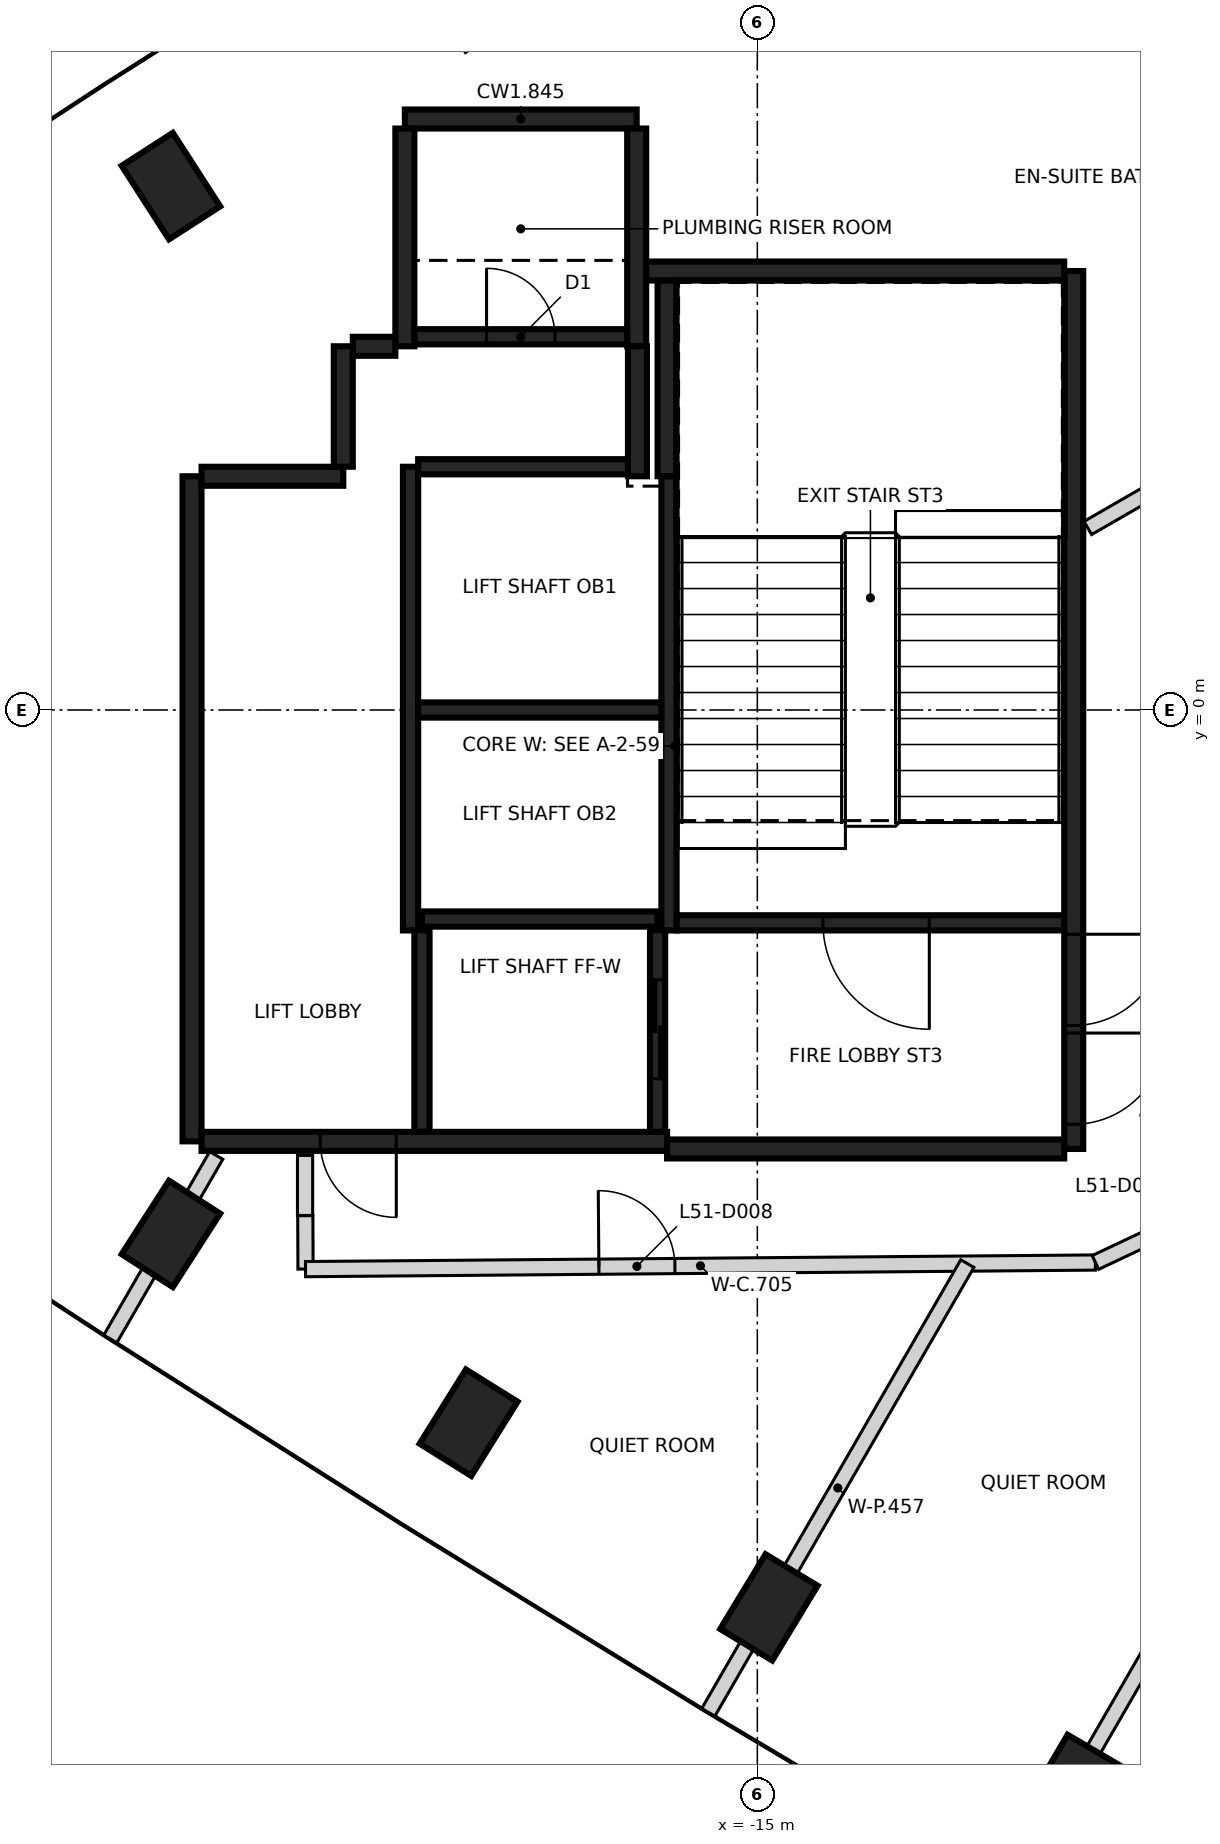
"""IFC4 building model, lengths in metres.
Left out: names, types, materials, properties, quantities, classifications, styles, units other than length and angle.
Written with IfcOpenShell. Run it as: python <this file> out.ifc"""

import sys

from ifc_helpers import new_model, si_unit, direction, frame, frame_2d, origin, origin_2d, place, context, subcontext, project, spatial, rectangle, extrude, element, fill, save


model = new_model("IFC4")
c1 = context("Model", 3, precision=1e-05, world=origin(), true_north=direction((0.0, 1.0)))
c2 = subcontext(c1, "Body", "Model", "MODEL_VIEW")
j1 = project(units=[si_unit("LENGTHUNIT", "METRE"), si_unit("PLANEANGLEUNIT", "RADIAN")], contexts=[c1])
p1 = place(None, origin())
s1 = spatial("IfcSite", under=j1, at=p1, CompositionType="ELEMENT")
p2 = place(p1, origin())
s2 = spatial("IfcBuilding", under=s1, at=p2, CompositionType="ELEMENT")
p3 = place(p2, frame((0.0, 0.0, 204.4)))
s3 = spatial("IfcBuildingStorey", under=s2, at=p3, CompositionType="ELEMENT", Elevation=204.4)
for number, where, z_axis, x_axis in (
    (1, (-22.715, 6.892, -0.35), (0.0, 0.0, 1.0), (-0.541, 0.841, 0.0)),
    (2, (-22.715, -6.892, -0.35), (0.0, 0.0, 1.0), (0.541, 0.841, 0.0)),
    (3, (-18.799, -9.376, -0.35), (0.0, 0.0, 1.0), (0.529, 0.848, 0.0)),
    (4, (-14.848, -11.806, -0.35), (0.0, 0.0, 1.0), (0.518, 0.855, 0.0)),
    (5, (-10.864, -14.18, -0.35), (0.0, 0.0, 1.0), (0.506, 0.862, 0.0)),
):
    element("IfcColumn", number, at=place(p3, frame(where, z_axis=z_axis, x_axis=x_axis)), inside=s3, PredefinedType="COLUMN", context=c2, shape_type="SweptSolid", body=[
        extrude(rectangle(XDim=1.15, YDim=0.8, at=origin_2d()), origin(), (0.0, 0.0, 1.0), 3.6),
    ])
p4 = place(p3, frame((-10.837, 5.775, 0.0), z_axis=(0.0, 0.0, 1.0), x_axis=(0.0, -1.0, 0.0)))
e6 = element("IfcWall", 6, at=p4, inside=s3, PredefinedType="SHEAR", context=c2, shape_type="SweptSolid", body=[
    extrude(rectangle(XDim=11.55, YDim=0.25, at=frame_2d((5.775, 0.0))), origin(), (0.0, 0.0, 1.0), 3.25),
])
p5 = place(p4, frame((10.025, 0.0, 0.0)))
e7 = element("IfcOpeningElement", 7, at=p5, cuts=e6, PredefinedType="OPENING", context=c2, shape_type="SweptSolid", body=[
    extrude(rectangle(XDim=1.2, YDim=2.1, at=frame_2d((0.6, 1.05))), frame((0.0, 0.135, 0.0), z_axis=(0.0, -1.0, 0.0), x_axis=(1.0, 0.0, 0.0)), (0.0, 0.0, 1.0), 0.27),
])
p6 = place(p4, frame((8.725, 0.0, 0.0)))
e8 = element("IfcOpeningElement", 8, at=p6, cuts=e6, PredefinedType="OPENING", context=c2, shape_type="SweptSolid", body=[
    extrude(rectangle(XDim=1.2, YDim=2.1, at=frame_2d((0.6, 1.05))), frame((0.0, 0.135, 0.0), z_axis=(0.0, -1.0, 0.0), x_axis=(1.0, 0.0, 0.0)), (0.0, 0.0, 1.0), 0.27),
])
p7 = place(p3, frame((-22.437, -5.675, 0.0), z_axis=(0.0, 0.0, 1.0), x_axis=(0.0, 1.0, 0.0)))
e9 = element("IfcWall", 9, at=p7, inside=s3, PredefinedType="SHEAR", context=c2, shape_type="SweptSolid", body=[
    extrude(rectangle(XDim=8.75, YDim=0.25, at=frame_2d((4.375, 0.0))), origin(), (0.0, 0.0, 1.0), 3.25),
])
p8 = place(p3, frame((-16.187, -5.675, 0.0), z_axis=(0.0, 0.0, 1.0), x_axis=(-1.0, 0.0, 0.0)))
e10 = element("IfcWall", 10, at=p8, inside=s3, PredefinedType="SHEAR", context=c2, shape_type="SweptSolid", body=[
    extrude(rectangle(XDim=6.125, YDim=0.25, at=frame_2d((3.062, 0.0))), origin(), (0.0, 0.0, 1.0), 3.25),
])
p9 = place(p8, frame((3.563, 0.0, 0.0)))
e11 = element("IfcOpeningElement", 11, at=p9, cuts=e10, PredefinedType="OPENING", context=c2, shape_type="SweptSolid", body=[
    extrude(rectangle(XDim=1.0, YDim=2.1, at=frame_2d((0.5, 1.05))), frame((0.0, 0.135, 0.0), z_axis=(0.0, -1.0, 0.0), x_axis=(1.0, 0.0, 0.0)), (0.0, 0.0, 1.0), 0.27),
])
p10 = place(p3, frame((-10.963, -5.775, 0.0), z_axis=(0.0, 0.0, 1.0), x_axis=(-1.0, 0.0, 0.0)))
e12 = element("IfcWall", 12, at=p10, inside=s3, PredefinedType="SHEAR", context=c2, shape_type="SweptSolid", body=[
    extrude(rectangle(XDim=5.225, YDim=0.25, at=frame_2d((2.612, 0.0))), origin(), (0.0, 0.0, 1.0), 3.25),
])
p11 = place(p3, frame((-16.472, 5.775, 0.0), z_axis=(0.0, 0.0, 1.0), x_axis=(1.0, 0.0, 0.0)))
e13 = element("IfcWall", 13, at=p11, inside=s3, PredefinedType="SHEAR", context=c2, shape_type="SweptSolid", body=[
    extrude(rectangle(XDim=5.51, YDim=0.25, at=frame_2d((2.755, 0.0))), origin(), (0.0, 0.0, 1.0), 3.25),
])
p12 = place(p3, frame((-19.637, 7.775, 0.0), z_axis=(0.0, 0.0, 1.0), x_axis=(1.0, 0.0, 0.0)))
e14 = element("IfcWall", 14, at=p12, inside=s3, PredefinedType="SHEAR", context=c2, shape_type="SweptSolid", body=[
    extrude(rectangle(XDim=3.05, YDim=0.25, at=frame_2d((1.525, 0.0))), origin(), (0.0, 0.0, 1.0), 3.25),
])
for number, where, z_axis, x_axis in (
    (15, (-16.587, 7.65, 0.0), (0.0, 0.0, 1.0), (0.0, -1.0, 0.0)),
    (16, (-19.637, 4.785, 0.0), (0.0, 0.0, 1.0), (0.0, 1.0, 0.0)),
):
    element("IfcWall", number, at=place(p3, frame(where, z_axis=z_axis, x_axis=x_axis)), inside=s3, PredefinedType="SHEAR", context=c2, shape_type="SweptSolid", body=[
        extrude(rectangle(XDim=2.865, YDim=0.25, at=frame_2d((1.432, 0.0))), origin(), (0.0, 0.0, 1.0), 3.25),
    ])
p13 = place(p3, frame((-16.187, 3.075, 0.0), z_axis=(0.0, 0.0, 1.0), x_axis=(0.0, 1.0, 0.0)))
e17 = element("IfcWall", 17, at=p13, inside=s3, PredefinedType="SHEAR", context=c2, shape_type="SweptSolid", body=[
    extrude(rectangle(XDim=2.575, YDim=0.25, at=frame_2d((1.287, 0.0))), origin(), (0.0, 0.0, 1.0), 3.25),
])
p14 = place(p3, frame((-22.312, 3.075, 0.0), z_axis=(0.0, 0.0, 1.0), x_axis=(1.0, 0.0, 0.0)))
e18 = element("IfcWall", 18, at=p14, inside=s3, PredefinedType="SHEAR", context=c2, shape_type="SweptSolid", body=[
    extrude(rectangle(XDim=1.865, YDim=0.25, at=frame_2d((0.932, 0.0))), origin(), (0.0, 0.0, 1.0), 3.25),
])
p15 = place(p3, frame((-16.577, 4.785, 0.0), z_axis=(0.0, 0.0, 1.0), x_axis=(0.0, -1.0, 0.0)))
e19 = element("IfcWall", 19, at=p15, inside=s3, PredefinedType="SHEAR", context=c2, shape_type="SweptSolid", body=[
    extrude(rectangle(XDim=1.71, YDim=0.25, at=frame_2d((0.855, 0.0))), origin(), (0.0, 0.0, 1.0), 3.25),
])
p16 = place(p3, frame((-20.447, 3.2, 0.0), z_axis=(0.0, 0.0, 1.0), x_axis=(0.0, 1.0, 0.0)))
e20 = element("IfcWall", 20, at=p16, inside=s3, PredefinedType="SHEAR", context=c2, shape_type="SweptSolid", body=[
    extrude(rectangle(XDim=1.584, YDim=0.25, at=frame_2d((0.792, 0.0))), origin(), (0.0, 0.0, 1.0), 3.25),
])
p17 = place(p3, frame((-20.322, 4.785, 0.0), z_axis=(0.0, 0.0, 1.0), x_axis=(1.0, 0.0, 0.0)))
e21 = element("IfcWall", 21, at=p17, inside=s3, PredefinedType="SHEAR", context=c2, shape_type="SweptSolid", body=[
    extrude(rectangle(XDim=0.559, YDim=0.25, at=frame_2d((0.28, 0.0))), origin(), (0.0, 0.0, 1.0), 3.25),
])
p18 = place(p3, frame((-16.162, 3.074, 0.0), z_axis=(0.0, 0.0, 1.0), x_axis=(0.0, -1.0, 0.0)))
e22 = element("IfcWall", 22, at=p18, inside=s3, PredefinedType="SHEAR", context=c2, shape_type="SweptSolid", body=[
    extrude(rectangle(XDim=5.974, YDim=0.2, at=frame_2d((2.987, 0.0))), origin(), (0.0, 0.0, 1.0), 3.25),
])
p19 = place(p3, frame((-19.562, -2.9, 0.0), z_axis=(0.0, 0.0, 1.0), x_axis=(0.0, 1.0, 0.0)))
e23 = element("IfcWall", 23, at=p19, inside=s3, PredefinedType="SHEAR", context=c2, shape_type="SweptSolid", body=[
    extrude(rectangle(XDim=6.1, YDim=0.2, at=frame_2d((3.05, 0.0))), origin(), (0.0, 0.0, 1.0), 3.25),
])
p20 = place(p3, frame((-10.963, -2.8, 0.0), z_axis=(0.0, 0.0, 1.0), x_axis=(-1.0, 0.0, 0.0)))
e24 = element("IfcWall", 24, at=p20, inside=s3, PredefinedType="SHEAR", context=c2, shape_type="SweptSolid", body=[
    extrude(rectangle(XDim=5.098, YDim=0.2, at=frame_2d((2.549, 0.0))), origin(), (0.0, 0.0, 1.0), 3.25),
])
p21 = place(p20, frame((1.774, 0.0, 0.0)))
e25 = element("IfcOpeningElement", 25, at=p21, cuts=e24, PredefinedType="OPENING", context=c2, shape_type="SweptSolid", body=[
    extrude(rectangle(XDim=1.4, YDim=2.1, at=frame_2d((0.7, 1.05))), frame((0.0, 0.11, 0.0), z_axis=(0.0, -1.0, 0.0), x_axis=(1.0, 0.0, 0.0)), (0.0, 0.0, 1.0), 0.22),
])
p22 = place(p3, frame((-16.263, 0.0, 0.0), z_axis=(0.0, 0.0, 1.0), x_axis=(-1.0, 0.0, 0.0)))
e26 = element("IfcWall", 26, at=p22, inside=s3, PredefinedType="SHEAR", context=c2, shape_type="SweptSolid", body=[
    extrude(rectangle(XDim=3.198, YDim=0.2, at=frame_2d((1.599, 0.0))), origin(), (0.0, 0.0, 1.0), 3.25),
])
p23 = place(p3, frame((-19.511, 4.91, 0.0), z_axis=(0.0, 0.0, 1.0), x_axis=(1.0, 0.0, 0.0)))
e27 = element("IfcWall", 27, at=p23, inside=s3, PredefinedType="SHEAR", context=c2, shape_type="SweptSolid", body=[
    extrude(rectangle(XDim=2.798, YDim=0.2, at=frame_2d((1.399, 0.0))), origin(), (0.0, 0.0, 1.0), 3.25),
])
p24 = place(p23, frame((0.949, 0.0, 0.0)))
e28 = element("IfcOpeningElement", 28, at=p24, cuts=e27, PredefinedType="OPENING", context=c2, shape_type="SweptSolid", body=[
    extrude(rectangle(XDim=0.9, YDim=2.1, at=frame_2d((0.45, 1.05))), frame((0.0, 0.11, 0.0), z_axis=(0.0, -1.0, 0.0), x_axis=(1.0, 0.0, 0.0)), (0.0, 0.0, 1.0), 0.22),
])
p25 = place(p3, frame((-19.462, 3.2, 0.0), z_axis=(0.0, 0.0, 1.0), x_axis=(1.0, 0.0, 0.0)))
e29 = element("IfcWall", 29, at=p25, inside=s3, PredefinedType="SHEAR", context=c2, shape_type="SweptSolid", body=[
    extrude(rectangle(XDim=2.759, YDim=0.2, at=frame_2d((1.379, 0.0))), origin(), (0.0, 0.0, 1.0), 3.25),
])
p26 = place(p3, frame((-19.412, -2.75, 0.0), z_axis=(0.0, 0.0, 1.0), x_axis=(1.0, 0.0, 0.0)))
e30 = element("IfcWall", 30, at=p26, inside=s3, PredefinedType="SHEAR", context=c2, shape_type="SweptSolid", body=[
    extrude(rectangle(XDim=3.1, YDim=0.2, at=frame_2d((1.55, 0.0))), origin(), (0.0, 0.0, 1.0), 3.25),
])
p27 = place(p3, frame((-16.312, -2.898, 0.0), z_axis=(0.0, 0.0, 1.0), x_axis=(0.0, -1.0, 0.0)))
e31 = element("IfcWall", 31, at=p27, inside=s3, PredefinedType="SHEAR", context=c2, shape_type="SweptSolid", body=[
    extrude(rectangle(XDim=2.651, YDim=0.2, at=frame_2d((1.325, 0.0))), origin(), (0.0, 0.0, 1.0), 3.25),
])
p28 = place(p27, frame((0.652, 0.0, 0.0)))
e32 = element("IfcOpeningElement", 32, at=p28, cuts=e31, PredefinedType="OPENING", context=c2, shape_type="SweptSolid", body=[
    extrude(rectangle(XDim=1.3, YDim=2.1, at=frame_2d((0.65, 1.05))), frame((0.0, 0.11, 0.0), z_axis=(0.0, -1.0, 0.0), x_axis=(1.0, 0.0, 0.0)), (0.0, 0.0, 1.0), 0.22),
])
p29 = place(p3, frame((-19.412, -5.549, 0.0), z_axis=(0.0, 0.0, 1.0), x_axis=(0.0, 1.0, 0.0)))
e33 = element("IfcWall", 33, at=p29, inside=s3, PredefinedType="SHEAR", context=c2, shape_type="SweptSolid", body=[
    extrude(rectangle(XDim=2.651, YDim=0.2, at=frame_2d((1.325, 0.0))), origin(), (0.0, 0.0, 1.0), 3.25),
])
p30 = place(p3, frame((-20.95, -6.65, 0.0), z_axis=(0.0, 0.0, 1.0), x_axis=(0.0, 1.0, 0.0)))
e34 = element("IfcWall", 34, at=p30, inside=s3, PredefinedType="PARTITIONING", context=c2, shape_type="SweptSolid", body=[
    extrude(rectangle(XDim=0.79, YDim=0.2, at=frame_2d((0.395, 0.0))), origin(), (0.0, 0.0, 1.0), 3.25),
])
p31 = place(p3, frame((-20.947, -6.653, 0.0), z_axis=(0.0, 0.0, 1.0), x_axis=(0.004173876686, -0.999991289339, 0.0)))
e35 = element("IfcWall", 35, at=p31, inside=s3, PredefinedType="PARTITIONING", context=c2, shape_type="SweptSolid", body=[
    extrude(rectangle(XDim=0.702, YDim=0.2, at=frame_2d((0.351, 0.0))), origin(), (0.0, 0.0, 1.0), 3.25),
])
p32 = place(p3, frame((-20.944, -7.356, 0.0), z_axis=(0.0, 0.0, 1.0), x_axis=(0.999965021341, 0.008363976025, 0.0)))
e36 = element("IfcWall", 36, at=p32, inside=s3, PredefinedType="PARTITIONING", context=c2, shape_type="SweptSolid", body=[
    extrude(rectangle(XDim=10.391, YDim=0.2, at=frame_2d((5.196, 0.0))), origin(), (0.0, 0.0, 1.0), 3.25),
])
p33 = place(p32, frame((3.86, 0.0, 0.0)))
e37 = element("IfcOpeningElement", 37, at=p33, cuts=e36, PredefinedType="OPENING", context=c2, shape_type="SweptSolid", body=[
    extrude(rectangle(XDim=1.0, YDim=2.1, at=frame_2d((0.5, 1.05))), frame((0.0, 0.11, 0.0), z_axis=(0.0, -1.0, 0.0), x_axis=(1.0, 0.0, 0.0)), (0.0, 0.0, 1.0), 0.22),
])
p34 = place(p3, frame((-10.652, 2.394, 0.0), z_axis=(0.0, 0.0, 1.0), x_axis=(0.866016271077, 0.500015817979, 0.0)))
e38 = element("IfcWall", 38, at=p34, inside=s3, PredefinedType="PARTITIONING", context=c2, shape_type="SweptSolid", body=[
    extrude(rectangle(XDim=12.991, YDim=0.2, at=frame_2d((6.495, 0.0))), origin(), (0.0, 0.0, 1.0), 3.25),
])
p35 = place(p34, frame((5.898, 0.0, 0.0)))
e39 = element("IfcOpeningElement", 39, at=p35, cuts=e38, PredefinedType="OPENING", context=c2, shape_type="SweptSolid", body=[
    extrude(rectangle(XDim=0.95, YDim=2.1, at=frame_2d((0.475, 1.05))), frame((0.0, 0.11, 0.0), z_axis=(0.0, -1.0, 0.0), x_axis=(1.0, 0.0, 0.0)), (0.0, 0.0, 1.0), 0.22),
])
p36 = place(p34, frame((1.571, 0.0, 0.0)))
e40 = element("IfcOpeningElement", 40, at=p36, cuts=e38, PredefinedType="OPENING", context=c2, shape_type="SweptSolid", body=[
    extrude(rectangle(XDim=0.95, YDim=2.1, at=frame_2d((0.475, 1.05))), frame((0.0, 0.11, 0.0), z_axis=(0.0, -1.0, 0.0), x_axis=(1.0, 0.0, 0.0)), (0.0, 0.0, 1.0), 0.22),
])
p37 = place(p3, frame((-10.552, -7.268, 0.0), z_axis=(0.0, 0.0, 1.0), x_axis=(0.904331815333, 0.426830139255, 0.0)))
e41 = element("IfcWall", 41, at=p37, inside=s3, PredefinedType="PARTITIONING", context=c2, shape_type="SweptSolid", body=[
    extrude(rectangle(XDim=0.944, YDim=0.2, at=frame_2d((0.472, 0.0))), origin(), (0.0, 0.0, 1.0), 3.25),
])
p38 = place(p3, frame((-23.512, -8.274, 0.0), z_axis=(0.0, 0.0, 1.0), x_axis=(0.499944854726, 0.866057239582, 0.0)))
e42 = element("IfcWall", 42, at=p38, inside=s3, PredefinedType="PARTITIONING", context=c2, shape_type="SweptSolid", body=[
    extrude(rectangle(XDim=2.787, YDim=0.2, at=frame_2d((1.394, 0.0))), origin(), (0.0, 0.0, 1.0), 3.25),
])
p39 = place(p3, frame((-15.645, -13.187, 0.0), z_axis=(0.0, 0.0, 1.0), x_axis=(0.499921913572, 0.866070482311, 0.0)))
e43 = element("IfcWall", 43, at=p39, inside=s3, PredefinedType="PARTITIONING", context=c2, shape_type="SweptSolid", body=[
    extrude(rectangle(XDim=6.816, YDim=0.2, at=frame_2d((3.408, 0.0))), origin(), (0.0, 0.0, 1.0), 3.25),
])
for number, where, z_axis, x_axis in (
    (44, (-11.661, -15.561, 0.0), (0.0, 0.0, 1.0), (0.5, 0.866, 0.0)),
    (45, (-11.661, 15.561, 0.0), (0.0, 0.0, 1.0), (0.5, -0.866, 0.0)),
):
    element("IfcWall", number, at=place(p3, frame(where, z_axis=z_axis, x_axis=x_axis)), inside=s3, PredefinedType="PARTITIONING", context=c2, shape_type="SweptSolid", body=[
        extrude(rectangle(XDim=11.907, YDim=0.2, at=frame_2d((5.953, 0.0))), origin(), (0.0, 0.0, 1.0), 3.25),
    ])
p40 = place(p28, origin())
e46 = element("IfcDoor", 46, at=p40, inside=s3, OperationType="SLIDING_TO_LEFT", PredefinedType="DOOR", context=c2, shape_type="SweptSolid", body=[
    extrude(rectangle(XDim=1.3, YDim=2.1, at=frame_2d((0.65, 1.05))), frame((0.0, 0.025, 0.0), z_axis=(0.0, -1.0, 0.0), x_axis=(1.0, 0.0, 0.0)), (0.0, 0.0, 1.0), 0.05),
])
fill(e32, e46)
p41 = place(p9, origin())
e47 = element("IfcDoor", 47, at=p41, inside=s3, OperationType="SINGLE_SWING_LEFT", PredefinedType="DOOR", context=c2, shape_type="SweptSolid", body=[
    extrude(rectangle(XDim=1.0, YDim=2.1, at=frame_2d((0.5, 1.05))), frame((0.0, 0.025, 0.0), z_axis=(0.0, -1.0, 0.0), x_axis=(1.0, 0.0, 0.0)), (0.0, 0.0, 1.0), 0.05),
])
fill(e11, e47)
p42 = place(p5, origin())
e48 = element("IfcDoor", 48, at=p42, inside=s3, OperationType="SINGLE_SWING_LEFT", PredefinedType="DOOR", context=c2, shape_type="SweptSolid", body=[
    extrude(rectangle(XDim=1.2, YDim=2.1, at=frame_2d((0.6, 1.05))), frame((0.0, 0.025, 0.0), z_axis=(0.0, -1.0, 0.0), x_axis=(1.0, 0.0, 0.0)), (0.0, 0.0, 1.0), 0.05),
])
fill(e7, e48)
p43 = place(p6, origin())
e49 = element("IfcDoor", 49, at=p43, inside=s3, OperationType="SINGLE_SWING_RIGHT", PredefinedType="DOOR", context=c2, shape_type="SweptSolid", body=[
    extrude(rectangle(XDim=1.2, YDim=2.1, at=frame_2d((0.6, 1.05))), frame((0.0, 0.025, 0.0), z_axis=(0.0, -1.0, 0.0), x_axis=(1.0, 0.0, 0.0)), (0.0, 0.0, 1.0), 0.05),
])
fill(e8, e49)
p44 = place(p21, origin())
e50 = element("IfcDoor", 50, at=p44, inside=s3, OperationType="SINGLE_SWING_LEFT", PredefinedType="DOOR", context=c2, shape_type="SweptSolid", body=[
    extrude(rectangle(XDim=1.4, YDim=2.1, at=frame_2d((0.7, 1.05))), frame((0.0, 0.025, 0.0), z_axis=(0.0, -1.0, 0.0), x_axis=(1.0, 0.0, 0.0)), (0.0, 0.0, 1.0), 0.05),
])
fill(e25, e50)
p45 = place(p24, origin())
e51 = element("IfcDoor", 51, at=p45, inside=s3, OperationType="SINGLE_SWING_RIGHT", PredefinedType="DOOR", context=c2, shape_type="SweptSolid", body=[
    extrude(rectangle(XDim=0.9, YDim=2.1, at=frame_2d((0.45, 1.05))), frame((0.0, 0.025, 0.0), z_axis=(0.0, -1.0, 0.0), x_axis=(1.0, 0.0, 0.0)), (0.0, 0.0, 1.0), 0.05),
])
fill(e28, e51)
p46 = place(p33, frame((1.0, 0.0, 0.0), z_axis=(0.0, 0.0, 1.0), x_axis=(-1.0, 0.0, 0.0)))
e52 = element("IfcDoor", 52, at=p46, inside=s3, OperationType="SINGLE_SWING_LEFT", PredefinedType="DOOR", context=c2, shape_type="SweptSolid", body=[
    extrude(rectangle(XDim=1.0, YDim=2.1, at=frame_2d((0.5, 1.05))), frame((0.0, 0.025, 0.0), z_axis=(0.0, -1.0, 0.0), x_axis=(1.0, 0.0, 0.0)), (0.0, 0.0, 1.0), 0.05),
])
fill(e37, e52)
save(model, sys.argv[1])
